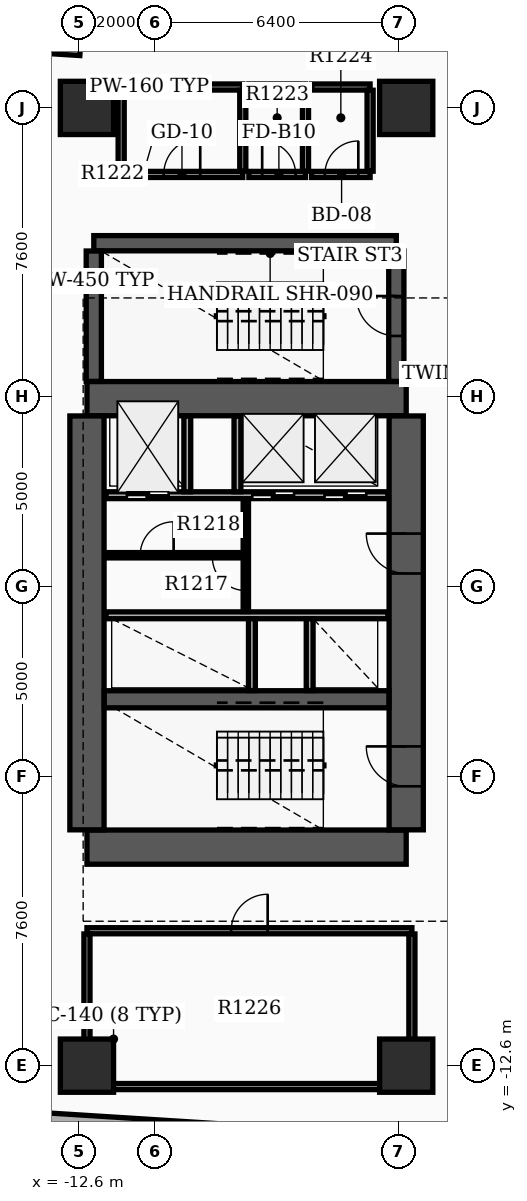
"""IFC4 building model, lengths in metres.
Left out: names, types, materials, properties, quantities, classifications, styles, units other than length and angle.
Written with IfcOpenShell. Run it as: python <this file> out.ifc"""

import sys

from ifc_helpers import new_model, si_unit, direction, frame, frame_2d, origin, origin_2d, place, context, subcontext, project, spatial, rectangle, extrude, element, fill, save


model = new_model("IFC4")
c1 = context("Model", 3, precision=1e-05, world=origin(), true_north=direction((0.0, 1.0)))
c2 = subcontext(c1, "Body", "Model", "MODEL_VIEW")
j1 = project(units=[si_unit("LENGTHUNIT", "METRE"), si_unit("PLANEANGLEUNIT", "RADIAN")], contexts=[c1])
p1 = place(None, origin())
s1 = spatial("IfcSite", under=j1, at=p1, CompositionType="ELEMENT")
p2 = place(p1, origin())
s2 = spatial("IfcBuilding", under=s1, at=p2, CompositionType="ELEMENT")
p3 = place(p2, frame((0.0, 0.0, 79.5)))
s3 = spatial("IfcBuildingStorey", under=s2, at=p3, CompositionType="ELEMENT", Elevation=79.5)
for number, where, z_axis, x_axis in (
    (1, (-12.4, -6.85, 0.0), (0.0, 0.0, 1.0), (1.0, 0.0, 0.0)),
    (2, (-12.4, 4.95, 0.0), (0.0, 0.0, 1.0), (1.0, 0.0, 0.0)),
):
    element("IfcWall", number, at=place(p3, frame(where, z_axis=z_axis, x_axis=x_axis)), inside=s3, PredefinedType="SHEAR", context=c2, shape_type="SweptSolid", body=[
        extrude(rectangle(XDim=8.4, YDim=0.9, at=frame_2d((4.2, 0.0))), origin(), (0.0, 0.0, 1.0), 3.7),
    ])
p4 = place(p3, frame((-12.4, -6.395, 0.0), z_axis=(0.0, 0.0, 1.0), x_axis=(0.0, 1.0, 0.0)))
e3 = element("IfcWall", 3, at=p4, inside=s3, PredefinedType="SHEAR", context=c2, shape_type="SweptSolid", body=[
    extrude(rectangle(XDim=10.89, YDim=0.9, at=frame_2d((5.445, 0.0))), origin(), (0.0, 0.0, 1.0), 3.7),
])
p5 = place(p3, frame((-4.0, -6.395, 0.0), z_axis=(0.0, 0.0, 1.0), x_axis=(0.0, 1.0, 0.0)))
e4 = element("IfcWall", 4, at=p5, inside=s3, PredefinedType="SHEAR", context=c2, shape_type="SweptSolid", body=[
    extrude(rectangle(XDim=10.89, YDim=0.9, at=frame_2d((5.445, 0.0))), origin(), (0.0, 0.0, 1.0), 3.7),
])
p6 = place(p5, frame((1.145, 0.0, 0.0)))
e5 = element("IfcOpeningElement", 5, at=p6, cuts=e4, PredefinedType="OPENING", context=c2, shape_type="SweptSolid", body=[
    extrude(rectangle(XDim=1.05, YDim=2.15, at=frame_2d((0.525, 1.075))), frame((0.0, 0.46, 0.0), z_axis=(0.0, -1.0, 0.0), x_axis=(1.0, 0.0, 0.0)), (0.0, 0.0, 1.0), 0.92),
])
p7 = place(p5, frame((6.745, 0.0, 0.0)))
e6 = element("IfcOpeningElement", 6, at=p7, cuts=e4, PredefinedType="OPENING", context=c2, shape_type="SweptSolid", body=[
    extrude(rectangle(XDim=1.05, YDim=2.15, at=frame_2d((0.525, 1.075))), frame((0.0, 0.46, 0.0), z_axis=(0.0, -1.0, 0.0), x_axis=(1.0, 0.0, 0.0)), (0.0, 0.0, 1.0), 0.92),
])
p8 = place(p3, frame((-11.945, -2.96, 0.0), z_axis=(0.0, 0.0, 1.0), x_axis=(1.0, 0.0, 0.0)))
e7 = element("IfcWall", 7, at=p8, inside=s3, PredefinedType="SHEAR", context=c2, shape_type="SweptSolid", body=[
    extrude(rectangle(XDim=7.49, YDim=0.45, at=frame_2d((3.745, 0.0))), origin(), (0.0, 0.0, 1.0), 3.7),
])
p9 = place(p3, frame((-12.22, 9.04, 0.0), z_axis=(0.0, 0.0, 1.0), x_axis=(1.0, 0.0, 0.0)))
e8 = element("IfcWall", 8, at=p9, inside=s3, PredefinedType="SHEAR", context=c2, shape_type="SweptSolid", body=[
    extrude(rectangle(XDim=7.96, YDim=0.4, at=frame_2d((3.98, 0.0))), origin(), (0.0, 0.0, 1.0), 3.7),
])
p10 = place(p3, frame((-12.22, 5.405, 0.0), z_axis=(0.0, 0.0, 1.0), x_axis=(0.0, 1.0, 0.0)))
e9 = element("IfcWall", 9, at=p10, inside=s3, PredefinedType="SHEAR", context=c2, shape_type="SweptSolid", body=[
    extrude(rectangle(XDim=3.43, YDim=0.4, at=frame_2d((1.715, 0.0))), origin(), (0.0, 0.0, 1.0), 3.7),
])
p11 = place(p3, frame((-4.26, 5.405, 0.0), z_axis=(0.0, 0.0, 1.0), x_axis=(0.0, 1.0, 0.0)))
e10 = element("IfcWall", 10, at=p11, inside=s3, PredefinedType="SHEAR", context=c2, shape_type="SweptSolid", body=[
    extrude(rectangle(XDim=3.43, YDim=0.4, at=frame_2d((1.715, 0.0))), origin(), (0.0, 0.0, 1.0), 3.7),
])
p12 = place(p11, frame((1.195, 0.0, 0.0)))
e11 = element("IfcOpeningElement", 11, at=p12, cuts=e10, PredefinedType="OPENING", context=c2, shape_type="SweptSolid", body=[
    extrude(rectangle(XDim=1.05, YDim=2.15, at=frame_2d((0.525, 1.075))), frame((0.0, 0.21, 0.0), z_axis=(0.0, -1.0, 0.0), x_axis=(1.0, 0.0, 0.0)), (0.0, 0.0, 1.0), 0.42),
])
for number, where, z_axis, x_axis in (
    (12, (-12.4, -12.6, 0.0), (0.0, 0.0, 1.0), (1.0, 0.0, 0.0)),
    (13, (-12.4, 12.6, 0.0), (0.0, 0.0, 1.0), (1.0, 0.0, 0.0)),
    (14, (-4.0, -12.6, 0.0), (0.0, 0.0, 1.0), (1.0, 0.0, 0.0)),
    (15, (-4.0, 12.6, 0.0), (0.0, 0.0, 1.0), (1.0, 0.0, 0.0)),
):
    element("IfcColumn", number, at=place(p3, frame(where, z_axis=z_axis, x_axis=x_axis)), inside=s3, PredefinedType="COLUMN", context=c2, shape_type="SweptSolid", body=[
        extrude(rectangle(XDim=1.4, YDim=1.4, at=origin_2d()), origin(), (0.0, 0.0, 1.0), 3.9),
    ])
p13 = place(p3, frame((-13.796, 14.194, 0.0), z_axis=(0.0, 0.0, 1.0), x_axis=(0.998023660242, -0.06283926796, 0.0)))
e16 = element("IfcWall", 16, at=p13, inside=s3, PredefinedType="STANDARD", context=c2, shape_type="SweptSolid", body=[
    extrude(rectangle(XDim=1.22, YDim=0.28, at=frame_2d((0.61, 0.0))), origin(), (0.0, 0.0, 1.0), 2.91),
])
p14 = place(p3, frame((-14.063, -13.945, 0.0), z_axis=(0.0, 0.0, 1.0), x_axis=(0.998027314704, -0.062781200242, 0.0)))
e17 = element("IfcWall", 17, at=p14, inside=s3, PredefinedType="STANDARD", context=c2, shape_type="SweptSolid", body=[
    extrude(rectangle(XDim=6.3, YDim=0.28, at=frame_2d((3.15, 0.0))), origin(), (0.0, 0.0, 1.0), 2.91),
])
p15 = place(p3, frame((-11.9, 2.41, 0.0), z_axis=(0.0, 0.0, 1.0), x_axis=(1.0, 0.0, 0.0)))
e18 = element("IfcWall", 18, at=p15, inside=s3, PredefinedType="SOLIDWALL", context=c2, shape_type="SweptSolid", body=[
    extrude(rectangle(XDim=7.42, YDim=0.18, at=frame_2d((3.71, 0.0))), origin(), (0.0, 0.0, 1.0), 2.9),
])
p16 = place(p15, frame((0.55, 0.0, 0.0)))
e19 = element("IfcOpeningElement", 19, at=p16, cuts=e18, PredefinedType="OPENING", context=c2, shape_type="SweptSolid", body=[
    extrude(rectangle(XDim=1.1, YDim=2.15, at=frame_2d((0.55, 1.075))), frame((0.0, 0.1, 0.0), z_axis=(0.0, -1.0, 0.0), x_axis=(1.0, 0.0, 0.0)), (0.0, 0.0, 1.0), 0.2),
])
p17 = place(p15, frame((3.85, 0.0, 0.0)))
e20 = element("IfcOpeningElement", 20, at=p17, cuts=e18, PredefinedType="OPENING", context=c2, shape_type="SweptSolid", body=[
    extrude(rectangle(XDim=1.1, YDim=2.15, at=frame_2d((0.55, 1.075))), frame((0.0, 0.1, 0.0), z_axis=(0.0, -1.0, 0.0), x_axis=(1.0, 0.0, 0.0)), (0.0, 0.0, 1.0), 0.2),
])
p18 = place(p15, frame((5.75, 0.0, 0.0)))
e21 = element("IfcOpeningElement", 21, at=p18, cuts=e18, PredefinedType="OPENING", context=c2, shape_type="SweptSolid", body=[
    extrude(rectangle(XDim=1.1, YDim=2.15, at=frame_2d((0.55, 1.075))), frame((0.0, 0.1, 0.0), z_axis=(0.0, -1.0, 0.0), x_axis=(1.0, 0.0, 0.0)), (0.0, 0.0, 1.0), 0.2),
])
p19 = place(p3, frame((-11.9, -0.75, 0.0), z_axis=(0.0, 0.0, 1.0), x_axis=(1.0, 0.0, 0.0)))
e22 = element("IfcWall", 22, at=p19, inside=s3, PredefinedType="SOLIDWALL", context=c2, shape_type="SweptSolid", body=[
    extrude(rectangle(XDim=7.42, YDim=0.18, at=frame_2d((3.71, 0.0))), origin(), (0.0, 0.0, 1.0), 2.9),
])
for number, where, z_axis, x_axis in (
    (23, (-9.76, 2.5, 0.0), (0.0, 0.0, 1.0), (0.0, 1.0, 0.0)),
    (24, (-8.44, 2.5, 0.0), (0.0, 0.0, 1.0), (0.0, 1.0, 0.0)),
):
    element("IfcWall", number, at=place(p3, frame(where, z_axis=z_axis, x_axis=x_axis)), inside=s3, PredefinedType="SOLIDWALL", context=c2, shape_type="SweptSolid", body=[
        extrude(rectangle(XDim=1.99, YDim=0.18, at=frame_2d((0.995, 0.0))), origin(), (0.0, 0.0, 1.0), 2.9),
    ])
for number, where, z_axis, x_axis in (
    (25, (-8.06, -2.73, 0.0), (0.0, 0.0, 1.0), (0.0, 1.0, 0.0)),
    (26, (-6.54, -2.73, 0.0), (0.0, 0.0, 1.0), (0.0, 1.0, 0.0)),
):
    element("IfcWall", number, at=place(p3, frame(where, z_axis=z_axis, x_axis=x_axis)), inside=s3, PredefinedType="SOLIDWALL", context=c2, shape_type="SweptSolid", body=[
        extrude(rectangle(XDim=1.89, YDim=0.18, at=frame_2d((0.945, 0.0))), origin(), (0.0, 0.0, 1.0), 2.9),
    ])
p20 = place(p3, frame((-8.22, -0.65, 0.0), z_axis=(0.0, 0.0, 1.0), x_axis=(0.0, 1.0, 0.0)))
e27 = element("IfcWall", 27, at=p20, inside=s3, PredefinedType="SOLIDWALL", context=c2, shape_type="SweptSolid", body=[
    extrude(rectangle(XDim=2.96, YDim=0.14, at=frame_2d((1.48, 0.0))), origin(), (0.0, 0.0, 1.0), 2.9),
])
p21 = place(p20, frame((0.55, 0.0, 0.0)))
e28 = element("IfcOpeningElement", 28, at=p21, cuts=e27, PredefinedType="OPENING", context=c2, shape_type="SweptSolid", body=[
    extrude(rectangle(XDim=0.88, YDim=2.1, at=frame_2d((0.44, 1.05))), frame((0.0, 0.08, 0.0), z_axis=(0.0, -1.0, 0.0), x_axis=(1.0, 0.0, 0.0)), (0.0, 0.0, 1.0), 0.16),
])
p22 = place(p3, frame((-11.85, 0.83, 0.0), z_axis=(0.0, 0.0, 1.0), x_axis=(1.0, 0.0, 0.0)))
e29 = element("IfcWall", 29, at=p22, inside=s3, PredefinedType="PARTITIONING", context=c2, shape_type="SweptSolid", body=[
    extrude(rectangle(XDim=3.552, YDim=0.14, at=frame_2d((1.776, 0.0))), origin(), (0.0, 0.0, 1.0), 2.9),
])
p23 = place(p22, frame((0.85, 0.0, 0.0)))
e30 = element("IfcOpeningElement", 30, at=p23, cuts=e29, PredefinedType="OPENING", context=c2, shape_type="SweptSolid", body=[
    extrude(rectangle(XDim=0.88, YDim=2.1, at=frame_2d((0.44, 1.05))), frame((0.0, 0.08, 0.0), z_axis=(0.0, -1.0, 0.0), x_axis=(1.0, 0.0, 0.0)), (0.0, 0.0, 1.0), 0.16),
])
p24 = place(p3, frame((-11.5, 10.85, 0.0), z_axis=(0.0, 0.0, 1.0), x_axis=(1.0, 0.0, 0.0)))
e31 = element("IfcWall", 31, at=p24, inside=s3, PredefinedType="PARTITIONING", context=c2, shape_type="SweptSolid", body=[
    extrude(rectangle(XDim=3.2, YDim=0.16, at=frame_2d((1.6, 0.0))), origin(), (0.0, 0.0, 1.0), 2.9),
])
p25 = place(p24, frame((1.12, 0.0, 0.0)))
e32 = element("IfcOpeningElement", 32, at=p25, cuts=e31, PredefinedType="OPENING", context=c2, shape_type="SweptSolid", body=[
    extrude(rectangle(XDim=0.96, YDim=2.15, at=frame_2d((0.48, 1.075))), frame((0.0, 0.09, 0.0), z_axis=(0.0, -1.0, 0.0), x_axis=(1.0, 0.0, 0.0)), (0.0, 0.0, 1.0), 0.18),
])
p26 = place(p3, frame((-11.5, 13.15, 0.0), z_axis=(0.0, 0.0, 1.0), x_axis=(1.0, 0.0, 0.0)))
e33 = element("IfcWall", 33, at=p26, inside=s3, PredefinedType="PARTITIONING", context=c2, shape_type="SweptSolid", body=[
    extrude(rectangle(XDim=3.2, YDim=0.16, at=frame_2d((1.6, 0.0))), origin(), (0.0, 0.0, 1.0), 2.9),
])
for number, where, z_axis, x_axis in (
    (34, (-11.5, 10.935, 0.0), (0.0, 0.0, 1.0), (0.0, 1.0, 0.0)),
    (35, (-8.3, 10.935, 0.0), (0.0, 0.0, 1.0), (0.0, 1.0, 0.0)),
):
    element("IfcWall", number, at=place(p3, frame(where, z_axis=z_axis, x_axis=x_axis)), inside=s3, PredefinedType="PARTITIONING", context=c2, shape_type="SweptSolid", body=[
        extrude(rectangle(XDim=2.13, YDim=0.16, at=frame_2d((1.065, 0.0))), origin(), (0.0, 0.0, 1.0), 2.9),
    ])
p27 = place(p3, frame((-8.14, 10.85, 0.0), z_axis=(0.0, 0.0, 1.0), x_axis=(1.0, 0.0, 0.0)))
e36 = element("IfcWall", 36, at=p27, inside=s3, PredefinedType="PARTITIONING", context=c2, shape_type="SweptSolid", body=[
    extrude(rectangle(XDim=1.49, YDim=0.16, at=frame_2d((0.745, 0.0))), origin(), (0.0, 0.0, 1.0), 2.9),
])
p28 = place(p27, frame((0.35, 0.0, 0.0)))
e37 = element("IfcOpeningElement", 37, at=p28, cuts=e36, PredefinedType="OPENING", context=c2, shape_type="SweptSolid", body=[
    extrude(rectangle(XDim=0.88, YDim=2.1, at=frame_2d((0.44, 1.05))), frame((0.0, 0.09, 0.0), z_axis=(0.0, -1.0, 0.0), x_axis=(1.0, 0.0, 0.0)), (0.0, 0.0, 1.0), 0.18),
])
p29 = place(p3, frame((-8.14, 13.15, 0.0), z_axis=(0.0, 0.0, 1.0), x_axis=(1.0, 0.0, 0.0)))
e38 = element("IfcWall", 38, at=p29, inside=s3, PredefinedType="PARTITIONING", context=c2, shape_type="SweptSolid", body=[
    extrude(rectangle(XDim=1.49, YDim=0.16, at=frame_2d((0.745, 0.0))), origin(), (0.0, 0.0, 1.0), 2.9),
])
p30 = place(p3, frame((-6.65, 10.935, 0.0), z_axis=(0.0, 0.0, 1.0), x_axis=(0.0, 1.0, 0.0)))
e39 = element("IfcWall", 39, at=p30, inside=s3, PredefinedType="PARTITIONING", context=c2, shape_type="SweptSolid", body=[
    extrude(rectangle(XDim=2.13, YDim=0.16, at=frame_2d((1.065, 0.0))), origin(), (0.0, 0.0, 1.0), 2.9),
])
p31 = place(p3, frame((-6.49, 10.85, 0.0), z_axis=(0.0, 0.0, 1.0), x_axis=(1.0, 0.0, 0.0)))
e40 = element("IfcWall", 40, at=p31, inside=s3, PredefinedType="PARTITIONING", context=c2, shape_type="SweptSolid", body=[
    extrude(rectangle(XDim=1.54, YDim=0.16, at=frame_2d((0.77, 0.0))), origin(), (0.0, 0.0, 1.0), 2.9),
])
p32 = place(p31, frame((0.35, 0.0, 0.0)))
e41 = element("IfcOpeningElement", 41, at=p32, cuts=e40, PredefinedType="OPENING", context=c2, shape_type="SweptSolid", body=[
    extrude(rectangle(XDim=0.88, YDim=2.15, at=frame_2d((0.44, 1.075))), frame((0.0, 0.09, 0.0), z_axis=(0.0, -1.0, 0.0), x_axis=(1.0, 0.0, 0.0)), (0.0, 0.0, 1.0), 0.18),
])
p33 = place(p3, frame((-6.49, 13.15, 0.0), z_axis=(0.0, 0.0, 1.0), x_axis=(1.0, 0.0, 0.0)))
e42 = element("IfcWall", 42, at=p33, inside=s3, PredefinedType="PARTITIONING", context=c2, shape_type="SweptSolid", body=[
    extrude(rectangle(XDim=1.54, YDim=0.16, at=frame_2d((0.77, 0.0))), origin(), (0.0, 0.0, 1.0), 2.9),
])
p34 = place(p3, frame((-4.95, 10.935, 0.0), z_axis=(0.0, 0.0, 1.0), x_axis=(0.0, 1.0, 0.0)))
e43 = element("IfcWall", 43, at=p34, inside=s3, PredefinedType="PARTITIONING", context=c2, shape_type="SweptSolid", body=[
    extrude(rectangle(XDim=2.13, YDim=0.16, at=frame_2d((1.065, 0.0))), origin(), (0.0, 0.0, 1.0), 2.9),
])
p35 = place(p3, frame((-12.4, -13.15, 0.0), z_axis=(0.0, 0.0, 1.0), x_axis=(1.0, 0.0, 0.0)))
e44 = element("IfcWall", 44, at=p35, inside=s3, PredefinedType="PARTITIONING", context=c2, shape_type="SweptSolid", body=[
    extrude(rectangle(XDim=8.55, YDim=0.16, at=frame_2d((4.275, 0.0))), origin(), (0.0, 0.0, 1.0), 2.9),
])
p36 = place(p3, frame((-12.4, -9.05, 0.0), z_axis=(0.0, 0.0, 1.0), x_axis=(1.0, 0.0, 0.0)))
e45 = element("IfcWall", 45, at=p36, inside=s3, PredefinedType="PARTITIONING", context=c2, shape_type="SweptSolid", body=[
    extrude(rectangle(XDim=8.55, YDim=0.16, at=frame_2d((4.275, 0.0))), origin(), (0.0, 0.0, 1.0), 2.9),
])
p37 = place(p36, frame((3.795, 0.0, 0.0)))
e46 = element("IfcOpeningElement", 46, at=p37, cuts=e45, PredefinedType="OPENING", context=c2, shape_type="SweptSolid", body=[
    extrude(rectangle(XDim=0.96, YDim=2.15, at=frame_2d((0.48, 1.075))), frame((0.0, 0.09, 0.0), z_axis=(0.0, -1.0, 0.0), x_axis=(1.0, 0.0, 0.0)), (0.0, 0.0, 1.0), 0.18),
])
for number, where, z_axis, x_axis in (
    (47, (-12.4, -13.065, 0.0), (0.0, 0.0, 1.0), (0.0, 1.0, 0.0)),
    (48, (-3.85, -13.065, 0.0), (0.0, 0.0, 1.0), (0.0, 1.0, 0.0)),
):
    element("IfcWall", number, at=place(p3, frame(where, z_axis=z_axis, x_axis=x_axis)), inside=s3, PredefinedType="PARTITIONING", context=c2, shape_type="SweptSolid", body=[
        extrude(rectangle(XDim=3.93, YDim=0.16, at=frame_2d((1.965, 0.0))), origin(), (0.0, 0.0, 1.0), 2.9),
    ])
p38 = place(p6, origin())
e49 = element("IfcDoor", 49, at=p38, inside=s3, OperationType="SINGLE_SWING_RIGHT", PredefinedType="DOOR", context=c2, shape_type="SweptSolid", body=[
    extrude(rectangle(XDim=1.05, YDim=2.15, at=frame_2d((0.525, 1.075))), frame((0.0, 0.025, 0.0), z_axis=(0.0, -1.0, 0.0), x_axis=(1.0, 0.0, 0.0)), (0.0, 0.0, 1.0), 0.05),
])
fill(e5, e49)
p39 = place(p7, origin())
e50 = element("IfcDoor", 50, at=p39, inside=s3, OperationType="SINGLE_SWING_RIGHT", PredefinedType="DOOR", context=c2, shape_type="SweptSolid", body=[
    extrude(rectangle(XDim=1.05, YDim=2.15, at=frame_2d((0.525, 1.075))), frame((0.0, 0.025, 0.0), z_axis=(0.0, -1.0, 0.0), x_axis=(1.0, 0.0, 0.0)), (0.0, 0.0, 1.0), 0.05),
])
fill(e6, e50)
p40 = place(p12, origin())
e51 = element("IfcDoor", 51, at=p40, inside=s3, OperationType="SINGLE_SWING_RIGHT", PredefinedType="DOOR", context=c2, shape_type="SweptSolid", body=[
    extrude(rectangle(XDim=1.05, YDim=2.15, at=frame_2d((0.525, 1.075))), frame((0.0, 0.025, 0.0), z_axis=(0.0, -1.0, 0.0), x_axis=(1.0, 0.0, 0.0)), (0.0, 0.0, 1.0), 0.05),
])
fill(e11, e51)
p41 = place(p16, origin())
e52 = element("IfcDoor", 52, at=p41, inside=s3, OperationType="DOUBLE_DOOR_SLIDING", PredefinedType="DOOR", context=c2, shape_type="SweptSolid", body=[
    extrude(rectangle(XDim=1.1, YDim=2.15, at=frame_2d((0.55, 1.075))), frame((0.0, 0.025, 0.0), z_axis=(0.0, -1.0, 0.0), x_axis=(1.0, 0.0, 0.0)), (0.0, 0.0, 1.0), 0.05),
])
fill(e19, e52)
p42 = place(p17, origin())
e53 = element("IfcDoor", 53, at=p42, inside=s3, OperationType="DOUBLE_DOOR_SLIDING", PredefinedType="DOOR", context=c2, shape_type="SweptSolid", body=[
    extrude(rectangle(XDim=1.1, YDim=2.15, at=frame_2d((0.55, 1.075))), frame((0.0, 0.025, 0.0), z_axis=(0.0, -1.0, 0.0), x_axis=(1.0, 0.0, 0.0)), (0.0, 0.0, 1.0), 0.05),
])
fill(e20, e53)
p43 = place(p18, origin())
e54 = element("IfcDoor", 54, at=p43, inside=s3, OperationType="DOUBLE_DOOR_SLIDING", PredefinedType="DOOR", context=c2, shape_type="SweptSolid", body=[
    extrude(rectangle(XDim=1.1, YDim=2.15, at=frame_2d((0.55, 1.075))), frame((0.0, 0.025, 0.0), z_axis=(0.0, -1.0, 0.0), x_axis=(1.0, 0.0, 0.0)), (0.0, 0.0, 1.0), 0.05),
])
fill(e21, e54)
p44 = place(p21, origin())
e55 = element("IfcDoor", 55, at=p44, inside=s3, OperationType="SINGLE_SWING_RIGHT", PredefinedType="DOOR", context=c2, shape_type="SweptSolid", body=[
    extrude(rectangle(XDim=0.88, YDim=2.1, at=frame_2d((0.44, 1.05))), frame((0.0, 0.025, 0.0), z_axis=(0.0, -1.0, 0.0), x_axis=(1.0, 0.0, 0.0)), (0.0, 0.0, 1.0), 0.05),
])
fill(e28, e55)
p45 = place(p23, origin())
e56 = element("IfcDoor", 56, at=p45, inside=s3, OperationType="SINGLE_SWING_RIGHT", PredefinedType="DOOR", context=c2, shape_type="SweptSolid", body=[
    extrude(rectangle(XDim=0.88, YDim=2.1, at=frame_2d((0.44, 1.05))), frame((0.0, 0.025, 0.0), z_axis=(0.0, -1.0, 0.0), x_axis=(1.0, 0.0, 0.0)), (0.0, 0.0, 1.0), 0.05),
])
fill(e30, e56)
p46 = place(p25, origin())
e57 = element("IfcDoor", 57, at=p46, inside=s3, OperationType="SINGLE_SWING_RIGHT", PredefinedType="DOOR", context=c2, shape_type="SweptSolid", body=[
    extrude(rectangle(XDim=0.96, YDim=2.15, at=frame_2d((0.48, 1.075))), frame((0.0, 0.025, 0.0), z_axis=(0.0, -1.0, 0.0), x_axis=(1.0, 0.0, 0.0)), (0.0, 0.0, 1.0), 0.05),
])
fill(e32, e57)
p47 = place(p28, origin())
e58 = element("IfcDoor", 58, at=p47, inside=s3, OperationType="SINGLE_SWING_LEFT", PredefinedType="DOOR", context=c2, shape_type="SweptSolid", body=[
    extrude(rectangle(XDim=0.88, YDim=2.1, at=frame_2d((0.44, 1.05))), frame((0.0, 0.025, 0.0), z_axis=(0.0, -1.0, 0.0), x_axis=(1.0, 0.0, 0.0)), (0.0, 0.0, 1.0), 0.05),
])
fill(e37, e58)
p48 = place(p32, origin())
e59 = element("IfcDoor", 59, at=p48, inside=s3, OperationType="SINGLE_SWING_RIGHT", PredefinedType="DOOR", context=c2, shape_type="SweptSolid", body=[
    extrude(rectangle(XDim=0.88, YDim=2.15, at=frame_2d((0.44, 1.075))), frame((0.0, 0.025, 0.0), z_axis=(0.0, -1.0, 0.0), x_axis=(1.0, 0.0, 0.0)), (0.0, 0.0, 1.0), 0.05),
])
fill(e41, e59)
p49 = place(p37, origin())
e60 = element("IfcDoor", 60, at=p49, inside=s3, OperationType="SINGLE_SWING_RIGHT", PredefinedType="DOOR", context=c2, shape_type="SweptSolid", body=[
    extrude(rectangle(XDim=0.96, YDim=2.15, at=frame_2d((0.48, 1.075))), frame((0.0, 0.025, 0.0), z_axis=(0.0, -1.0, 0.0), x_axis=(1.0, 0.0, 0.0)), (0.0, 0.0, 1.0), 0.05),
])
fill(e46, e60)
save(model, sys.argv[1])
